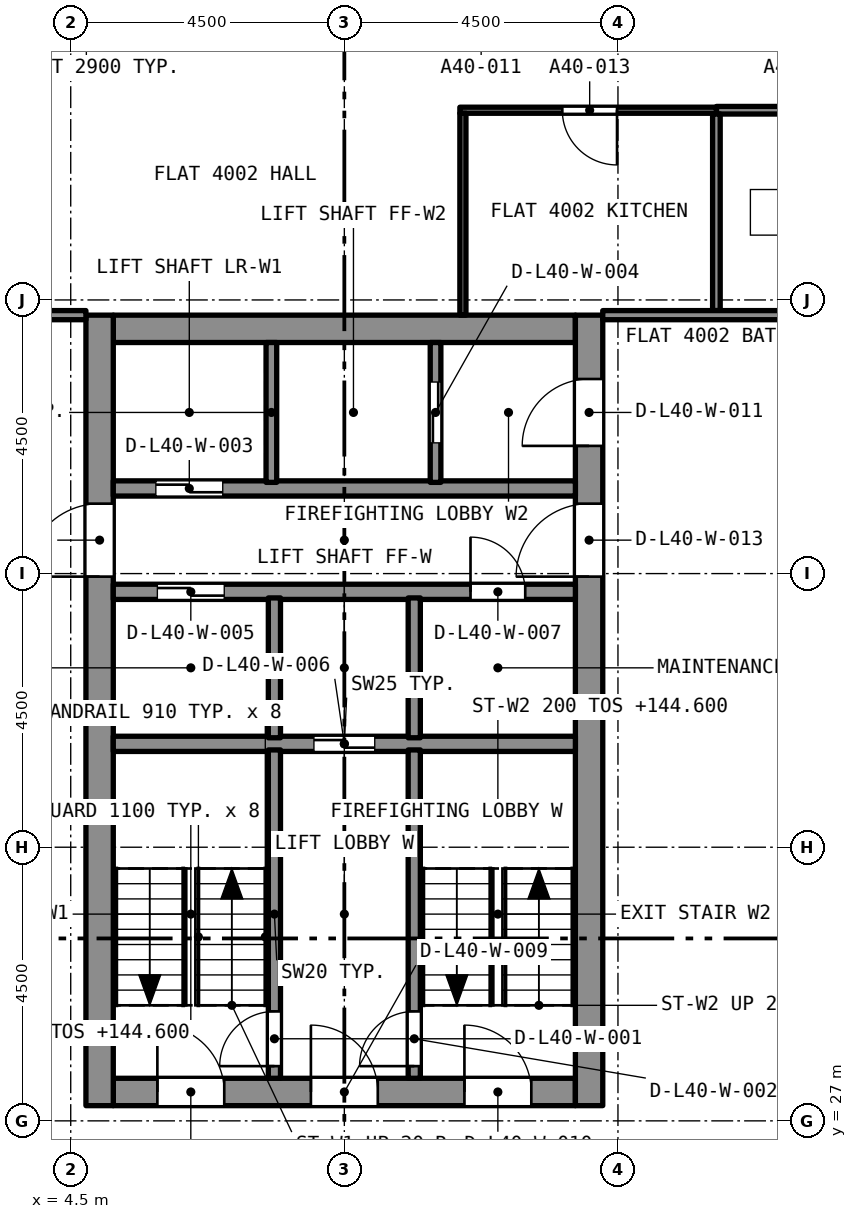
"""IFC4 building model, lengths in metres.
Left out: names, types, materials, properties, quantities, classifications, styles, units other than length and angle.
Written with IfcOpenShell. Run it as: python <this file> out.ifc"""

import sys

from ifc_helpers import new_model, si_unit, direction, frame, frame_2d, origin, place, context, subcontext, project, spatial, rectangle, extrude, element, fill, save


model = new_model("IFC4")
c1 = context("Model", 3, precision=1e-05, world=origin(), true_north=direction((0.0, 1.0)))
c2 = subcontext(c1, "Body", "Model", "MODEL_VIEW")
j1 = project(units=[si_unit("LENGTHUNIT", "METRE"), si_unit("PLANEANGLEUNIT", "RADIAN")], contexts=[c1])
p1 = place(None, origin())
s1 = spatial("IfcSite", under=j1, at=p1, CompositionType="ELEMENT")
p2 = place(p1, origin())
s2 = spatial("IfcBuilding", under=s1, at=p2, CompositionType="ELEMENT")
p3 = place(p2, frame((0.0, 0.0, 143.0)))
s3 = spatial("IfcBuildingStorey", under=s2, at=p3, CompositionType="ELEMENT", Elevation=143.0)
p4 = place(p3, frame((5.2, 27.475, 0.0), z_axis=(0.0, 0.0, 1.0), x_axis=(1.0, 0.0, 0.0)))
e1 = element("IfcWall", 1, at=p4, inside=s3, PredefinedType="SOLIDWALL", context=c2, shape_type="SweptSolid", body=[
    extrude(rectangle(XDim=7.6, YDim=0.45, at=frame_2d((3.8, 0.0))), origin(), (0.0, 0.0, 1.0), 3.2),
])
p5 = place(p4, frame((0.725, 0.0, 0.0)))
e2 = element("IfcOpeningElement", 2, at=p5, cuts=e1, PredefinedType="OPENING", context=c2, shape_type="SweptSolid", body=[
    extrude(rectangle(XDim=1.1, YDim=2.1, at=frame_2d((0.55, 1.05))), frame((0.0, 0.235, 0.0), z_axis=(0.0, -1.0, 0.0), x_axis=(1.0, 0.0, 0.0)), (0.0, 0.0, 1.0), 0.47),
])
p6 = place(p4, frame((3.25, 0.0, 0.0)))
e3 = element("IfcOpeningElement", 3, at=p6, cuts=e1, PredefinedType="OPENING", context=c2, shape_type="SweptSolid", body=[
    extrude(rectangle(XDim=1.1, YDim=2.1, at=frame_2d((0.55, 1.05))), frame((0.0, 0.235, 0.0), z_axis=(0.0, -1.0, 0.0), x_axis=(1.0, 0.0, 0.0)), (0.0, 0.0, 1.0), 0.47),
])
p7 = place(p4, frame((5.775, 0.0, 0.0)))
e4 = element("IfcOpeningElement", 4, at=p7, cuts=e1, PredefinedType="OPENING", context=c2, shape_type="SweptSolid", body=[
    extrude(rectangle(XDim=1.1, YDim=2.1, at=frame_2d((0.55, 1.05))), frame((0.0, 0.235, 0.0), z_axis=(0.0, -1.0, 0.0), x_axis=(1.0, 0.0, 0.0)), (0.0, 0.0, 1.0), 0.47),
])
p8 = place(p3, frame((5.2, 40.025, 0.0), z_axis=(0.0, 0.0, 1.0), x_axis=(1.0, 0.0, 0.0)))
e5 = element("IfcWall", 5, at=p8, inside=s3, PredefinedType="SOLIDWALL", context=c2, shape_type="SweptSolid", body=[
    extrude(rectangle(XDim=7.6, YDim=0.45, at=frame_2d((3.8, 0.0))), origin(), (0.0, 0.0, 1.0), 3.2),
])
p9 = place(p3, frame((4.975, 27.25, 0.0), z_axis=(0.0, 0.0, 1.0), x_axis=(0.0, 1.0, 0.0)))
e6 = element("IfcWall", 6, at=p9, inside=s3, PredefinedType="SOLIDWALL", context=c2, shape_type="SweptSolid", body=[
    extrude(rectangle(XDim=13.0, YDim=0.45, at=frame_2d((6.5, 0.0))), origin(), (0.0, 0.0, 1.0), 3.2),
])
p10 = place(p9, frame((8.7, 0.0, 0.0)))
e7 = element("IfcOpeningElement", 7, at=p10, cuts=e6, PredefinedType="OPENING", context=c2, shape_type="SweptSolid", body=[
    extrude(rectangle(XDim=1.2, YDim=2.1, at=frame_2d((0.6, 1.05))), frame((0.0, 0.235, 0.0), z_axis=(0.0, -1.0, 0.0), x_axis=(1.0, 0.0, 0.0)), (0.0, 0.0, 1.0), 0.47),
])
p11 = place(p3, frame((13.025, 27.25, 0.0), z_axis=(0.0, 0.0, 1.0), x_axis=(0.0, 1.0, 0.0)))
e8 = element("IfcWall", 8, at=p11, inside=s3, PredefinedType="SOLIDWALL", context=c2, shape_type="SweptSolid", body=[
    extrude(rectangle(XDim=13.0, YDim=0.45, at=frame_2d((6.5, 0.0))), origin(), (0.0, 0.0, 1.0), 3.2),
])
p12 = place(p11, frame((10.85, 0.0, 0.0)))
e9 = element("IfcOpeningElement", 9, at=p12, cuts=e8, PredefinedType="OPENING", context=c2, shape_type="SweptSolid", body=[
    extrude(rectangle(XDim=1.1, YDim=2.1, at=frame_2d((0.55, 1.05))), frame((0.0, 0.235, 0.0), z_axis=(0.0, -1.0, 0.0), x_axis=(1.0, 0.0, 0.0)), (0.0, 0.0, 1.0), 0.47),
])
p13 = place(p11, frame((8.7, 0.0, 0.0)))
e10 = element("IfcOpeningElement", 10, at=p13, cuts=e8, PredefinedType="OPENING", context=c2, shape_type="SweptSolid", body=[
    extrude(rectangle(XDim=1.2, YDim=2.1, at=frame_2d((0.6, 1.05))), frame((0.0, 0.235, 0.0), z_axis=(0.0, -1.0, 0.0), x_axis=(1.0, 0.0, 0.0)), (0.0, 0.0, 1.0), 0.47),
])
p14 = place(p3, frame((17.875, 43.62, 0.0), z_axis=(0.0, 0.0, 1.0), x_axis=(-1.0, 0.0, 0.0)))
e11 = element("IfcWall", 11, at=p14, inside=s3, PredefinedType="PARTITIONING", context=c2, shape_type="SweptSolid", body=[
    extrude(rectangle(XDim=2.756, YDim=0.125, at=frame_2d((1.378, 0.0))), origin(), (0.0, 0.0, 1.0), 2.9),
])
p15 = place(p14, frame((0.915, 0.0, 0.0)))
e12 = element("IfcOpeningElement", 12, at=p15, cuts=e11, PredefinedType="OPENING", context=c2, shape_type="SweptSolid", body=[
    extrude(rectangle(XDim=0.8, YDim=2.1, at=frame_2d((0.4, 1.05))), frame((0.0, 0.073, 0.0), z_axis=(0.0, -1.0, 0.0), x_axis=(1.0, 0.0, 0.0)), (0.0, 0.0, 1.0), 0.145),
])
p16 = place(p3, frame((15.119, 40.325, 0.0), z_axis=(0.0, 0.0, 1.0), x_axis=(0.0, 1.0, 0.0)))
e13 = element("IfcWall", 13, at=p16, inside=s3, PredefinedType="PARTITIONING", context=c2, shape_type="SweptSolid", body=[
    extrude(rectangle(XDim=3.233, YDim=0.125, at=frame_2d((1.616, 0.0))), origin(), (0.0, 0.0, 1.0), 2.9),
])
p17 = place(p3, frame((15.119, 43.62, 0.0), z_axis=(0.0, 0.0, 1.0), x_axis=(-1.0, 0.0, 0.0)))
e14 = element("IfcWall", 14, at=p17, inside=s3, PredefinedType="PARTITIONING", context=c2, shape_type="SweptSolid", body=[
    extrude(rectangle(XDim=4.219, YDim=0.1, at=frame_2d((2.11, 0.0))), origin(), (0.0, 0.0, 1.0), 2.9),
])
p18 = place(p17, frame((1.635, 0.0, 0.0)))
e15 = element("IfcOpeningElement", 15, at=p18, cuts=e14, PredefinedType="OPENING", context=c2, shape_type="SweptSolid", body=[
    extrude(rectangle(XDim=0.9, YDim=2.1, at=frame_2d((0.45, 1.05))), frame((0.0, 0.06, 0.0), z_axis=(0.0, -1.0, 0.0), x_axis=(1.0, 0.0, 0.0)), (0.0, 0.0, 1.0), 0.12),
])
p19 = place(p3, frame((10.95, 40.25, 0.0), z_axis=(0.0, 0.0, 1.0), x_axis=(0.0, 1.0, 0.0)))
e16 = element("IfcWall", 16, at=p19, inside=s3, PredefinedType="PARTITIONING", context=c2, shape_type="SweptSolid", body=[
    extrude(rectangle(XDim=3.32, YDim=0.1, at=frame_2d((1.66, 0.0))), origin(), (0.0, 0.0, 1.0), 2.9),
])
p20 = place(p3, frame((0.475, 40.25, 0.0), z_axis=(0.0, 0.0, 1.0), x_axis=(1.0, 0.0, 0.0)))
e17 = element("IfcWall", 17, at=p20, inside=s3, PredefinedType="PARTITIONING", context=c2, shape_type="SweptSolid", body=[
    extrude(rectangle(XDim=4.275, YDim=0.15, at=frame_2d((2.137, 0.0))), origin(), (0.0, 0.0, 1.0), 2.9),
])
p21 = place(p20, frame((1.275, 0.0, 0.0)))
e18 = element("IfcOpeningElement", 18, at=p21, cuts=e17, PredefinedType="OPENING", context=c2, shape_type="SweptSolid", body=[
    extrude(rectangle(XDim=1.0, YDim=2.1, at=frame_2d((0.5, 1.05))), frame((0.0, 0.085, 0.0), z_axis=(0.0, -1.0, 0.0), x_axis=(1.0, 0.0, 0.0)), (0.0, 0.0, 1.0), 0.17),
])
p22 = place(p3, frame((13.25, 40.25, 0.0), z_axis=(0.0, 0.0, 1.0), x_axis=(1.0, 0.0, 0.0)))
e19 = element("IfcWall", 19, at=p22, inside=s3, PredefinedType="PARTITIONING", context=c2, shape_type="SweptSolid", body=[
    extrude(rectangle(XDim=4.275, YDim=0.15, at=frame_2d((2.137, 0.0))), origin(), (0.0, 0.0, 1.0), 2.9),
])
p23 = place(p3, frame((5.2, 33.2, 0.0), z_axis=(0.0, 0.0, 1.0), x_axis=(1.0, 0.0, 0.0)))
e20 = element("IfcWall", 20, at=p23, inside=s3, PredefinedType="SOLIDWALL", context=c2, shape_type="SweptSolid", body=[
    extrude(rectangle(XDim=7.6, YDim=0.25, at=frame_2d((3.8, 0.0))), origin(), (0.0, 0.0, 1.0), 2.9),
])
p24 = place(p23, frame((3.3, 0.0, 0.0)))
e21 = element("IfcOpeningElement", 21, at=p24, cuts=e20, PredefinedType="OPENING", context=c2, shape_type="SweptSolid", body=[
    extrude(rectangle(XDim=1.0, YDim=2.1, at=frame_2d((0.5, 1.05))), frame((0.0, 0.135, 0.0), z_axis=(0.0, -1.0, 0.0), x_axis=(1.0, 0.0, 0.0)), (0.0, 0.0, 1.0), 0.27),
])
p25 = place(p3, frame((5.2, 35.7, 0.0), z_axis=(0.0, 0.0, 1.0), x_axis=(1.0, 0.0, 0.0)))
e22 = element("IfcWall", 22, at=p25, inside=s3, PredefinedType="SOLIDWALL", context=c2, shape_type="SweptSolid", body=[
    extrude(rectangle(XDim=7.6, YDim=0.25, at=frame_2d((3.8, 0.0))), origin(), (0.0, 0.0, 1.0), 2.9),
])
p26 = place(p25, frame((0.725, 0.0, 0.0)))
e23 = element("IfcOpeningElement", 23, at=p26, cuts=e22, PredefinedType="OPENING", context=c2, shape_type="SweptSolid", body=[
    extrude(rectangle(XDim=1.1, YDim=2.4, at=frame_2d((0.55, 1.2))), frame((0.0, 0.135, 0.0), z_axis=(0.0, -1.0, 0.0), x_axis=(1.0, 0.0, 0.0)), (0.0, 0.0, 1.0), 0.27),
])
p27 = place(p25, frame((5.875, 0.0, 0.0)))
e24 = element("IfcOpeningElement", 24, at=p27, cuts=e22, PredefinedType="OPENING", context=c2, shape_type="SweptSolid", body=[
    extrude(rectangle(XDim=0.9, YDim=2.1, at=frame_2d((0.45, 1.05))), frame((0.0, 0.135, 0.0), z_axis=(0.0, -1.0, 0.0), x_axis=(1.0, 0.0, 0.0)), (0.0, 0.0, 1.0), 0.27),
])
p28 = place(p3, frame((5.2, 37.4, 0.0), z_axis=(0.0, 0.0, 1.0), x_axis=(1.0, 0.0, 0.0)))
e25 = element("IfcWall", 25, at=p28, inside=s3, PredefinedType="SOLIDWALL", context=c2, shape_type="SweptSolid", body=[
    extrude(rectangle(XDim=7.6, YDim=0.25, at=frame_2d((3.8, 0.0))), origin(), (0.0, 0.0, 1.0), 2.9),
])
p29 = place(p28, frame((0.7, 0.0, 0.0)))
e26 = element("IfcOpeningElement", 26, at=p29, cuts=e25, PredefinedType="OPENING", context=c2, shape_type="SweptSolid", body=[
    extrude(rectangle(XDim=1.1, YDim=2.4, at=frame_2d((0.55, 1.2))), frame((0.0, 0.135, 0.0), z_axis=(0.0, -1.0, 0.0), x_axis=(1.0, 0.0, 0.0)), (0.0, 0.0, 1.0), 0.27),
])
p30 = place(p3, frame((7.85, 27.7, 0.0), z_axis=(0.0, 0.0, 1.0), x_axis=(0.0, 1.0, 0.0)))
e27 = element("IfcWall", 27, at=p30, inside=s3, PredefinedType="SOLIDWALL", context=c2, shape_type="SweptSolid", body=[
    extrude(rectangle(XDim=5.4, YDim=0.2, at=frame_2d((2.7, 0.0))), origin(), (0.0, 0.0, 1.0), 2.9),
])
p31 = place(p30, frame((0.2, 0.0, 0.0)))
e28 = element("IfcOpeningElement", 28, at=p31, cuts=e27, PredefinedType="OPENING", context=c2, shape_type="SweptSolid", body=[
    extrude(rectangle(XDim=0.9, YDim=2.1, at=frame_2d((0.45, 1.05))), frame((0.0, 0.11, 0.0), z_axis=(0.0, -1.0, 0.0), x_axis=(1.0, 0.0, 0.0)), (0.0, 0.0, 1.0), 0.22),
])
p32 = place(p3, frame((10.15, 27.7, 0.0), z_axis=(0.0, 0.0, 1.0), x_axis=(0.0, 1.0, 0.0)))
e29 = element("IfcWall", 29, at=p32, inside=s3, PredefinedType="SOLIDWALL", context=c2, shape_type="SweptSolid", body=[
    extrude(rectangle(XDim=5.4, YDim=0.2, at=frame_2d((2.7, 0.0))), origin(), (0.0, 0.0, 1.0), 2.9),
])
p33 = place(p32, frame((0.2, 0.0, 0.0)))
e30 = element("IfcOpeningElement", 30, at=p33, cuts=e29, PredefinedType="OPENING", context=c2, shape_type="SweptSolid", body=[
    extrude(rectangle(XDim=0.9, YDim=2.1, at=frame_2d((0.45, 1.05))), frame((0.0, 0.11, 0.0), z_axis=(0.0, -1.0, 0.0), x_axis=(1.0, 0.0, 0.0)), (0.0, 0.0, 1.0), 0.22),
])
for number, where, z_axis, x_axis in (
    (31, (7.85, 33.3, 0.0), (0.0, 0.0, 1.0), (0.0, 1.0, 0.0)),
    (32, (10.15, 33.3, 0.0), (0.0, 0.0, 1.0), (0.0, 1.0, 0.0)),
):
    element("IfcWall", number, at=place(p3, frame(where, z_axis=z_axis, x_axis=x_axis)), inside=s3, PredefinedType="SOLIDWALL", context=c2, shape_type="SweptSolid", body=[
        extrude(rectangle(XDim=2.3, YDim=0.2, at=frame_2d((1.15, 0.0))), origin(), (0.0, 0.0, 1.0), 2.9),
    ])
p34 = place(p3, frame((7.8, 37.5, 0.0), z_axis=(0.0, 0.0, 1.0), x_axis=(0.0, 1.0, 0.0)))
e33 = element("IfcWall", 33, at=p34, inside=s3, PredefinedType="SOLIDWALL", context=c2, shape_type="SweptSolid", body=[
    extrude(rectangle(XDim=2.3, YDim=0.175, at=frame_2d((1.15, 0.0))), origin(), (0.0, 0.0, 1.0), 2.9),
])
p35 = place(p3, frame((10.5, 37.5, 0.0), z_axis=(0.0, 0.0, 1.0), x_axis=(0.0, 1.0, 0.0)))
e34 = element("IfcWall", 34, at=p35, inside=s3, PredefinedType="SOLIDWALL", context=c2, shape_type="SweptSolid", body=[
    extrude(rectangle(XDim=2.3, YDim=0.175, at=frame_2d((1.15, 0.0))), origin(), (0.0, 0.0, 1.0), 2.9),
])
p36 = place(p35, frame((0.65, 0.0, 0.0)))
e35 = element("IfcOpeningElement", 35, at=p36, cuts=e34, PredefinedType="OPENING", context=c2, shape_type="SweptSolid", body=[
    extrude(rectangle(XDim=1.0, YDim=2.1, at=frame_2d((0.5, 1.05))), frame((0.0, 0.097, 0.0), z_axis=(0.0, -1.0, 0.0), x_axis=(1.0, 0.0, 0.0)), (0.0, 0.0, 1.0), 0.195),
])
p37 = place(p18, origin())
e36 = element("IfcDoor", 36, at=p37, inside=s3, OperationType="SINGLE_SWING_LEFT", PredefinedType="DOOR", context=c2, shape_type="SweptSolid", body=[
    extrude(rectangle(XDim=0.9, YDim=2.1, at=frame_2d((0.45, 1.05))), frame((0.0, 0.025, 0.0), z_axis=(0.0, -1.0, 0.0), x_axis=(1.0, 0.0, 0.0)), (0.0, 0.0, 1.0), 0.05),
])
fill(e15, e36)
p38 = place(p31, origin())
e37 = element("IfcDoor", 37, at=p38, inside=s3, OperationType="SINGLE_SWING_LEFT", PredefinedType="DOOR", context=c2, shape_type="SweptSolid", body=[
    extrude(rectangle(XDim=0.9, YDim=2.1, at=frame_2d((0.45, 1.05))), frame((0.0, 0.025, 0.0), z_axis=(0.0, -1.0, 0.0), x_axis=(1.0, 0.0, 0.0)), (0.0, 0.0, 1.0), 0.05),
])
fill(e28, e37)
p39 = place(p33, origin())
e38 = element("IfcDoor", 38, at=p39, inside=s3, OperationType="SINGLE_SWING_LEFT", PredefinedType="DOOR", context=c2, shape_type="SweptSolid", body=[
    extrude(rectangle(XDim=0.9, YDim=2.1, at=frame_2d((0.45, 1.05))), frame((0.0, 0.025, 0.0), z_axis=(0.0, -1.0, 0.0), x_axis=(1.0, 0.0, 0.0)), (0.0, 0.0, 1.0), 0.05),
])
fill(e30, e38)
p40 = place(p29, origin())
e39 = element("IfcDoor", 39, at=p40, inside=s3, OperationType="SLIDING_TO_LEFT", PredefinedType="DOOR", context=c2, shape_type="SweptSolid", body=[
    extrude(rectangle(XDim=1.1, YDim=2.4, at=frame_2d((0.55, 1.2))), frame((0.0, 0.025, 0.0), z_axis=(0.0, -1.0, 0.0), x_axis=(1.0, 0.0, 0.0)), (0.0, 0.0, 1.0), 0.05),
])
fill(e26, e39)
p41 = place(p36, origin())
e40 = element("IfcDoor", 40, at=p41, inside=s3, OperationType="SLIDING_TO_LEFT", PredefinedType="DOOR", context=c2, shape_type="SweptSolid", body=[
    extrude(rectangle(XDim=1.0, YDim=2.1, at=frame_2d((0.5, 1.05))), frame((0.0, 0.025, 0.0), z_axis=(0.0, -1.0, 0.0), x_axis=(1.0, 0.0, 0.0)), (0.0, 0.0, 1.0), 0.05),
])
fill(e35, e40)
p42 = place(p26, origin())
e41 = element("IfcDoor", 41, at=p42, inside=s3, OperationType="SLIDING_TO_LEFT", PredefinedType="DOOR", context=c2, shape_type="SweptSolid", body=[
    extrude(rectangle(XDim=1.1, YDim=2.4, at=frame_2d((0.55, 1.2))), frame((0.0, 0.025, 0.0), z_axis=(0.0, -1.0, 0.0), x_axis=(1.0, 0.0, 0.0)), (0.0, 0.0, 1.0), 0.05),
])
fill(e23, e41)
p43 = place(p24, origin())
e42 = element("IfcDoor", 42, at=p43, inside=s3, OperationType="SLIDING_TO_LEFT", PredefinedType="DOOR", context=c2, shape_type="SweptSolid", body=[
    extrude(rectangle(XDim=1.0, YDim=2.1, at=frame_2d((0.5, 1.05))), frame((0.0, 0.025, 0.0), z_axis=(0.0, -1.0, 0.0), x_axis=(1.0, 0.0, 0.0)), (0.0, 0.0, 1.0), 0.05),
])
fill(e21, e42)
p44 = place(p27, origin())
e43 = element("IfcDoor", 43, at=p44, inside=s3, OperationType="SINGLE_SWING_LEFT", PredefinedType="DOOR", context=c2, shape_type="SweptSolid", body=[
    extrude(rectangle(XDim=0.9, YDim=2.1, at=frame_2d((0.45, 1.05))), frame((0.0, 0.025, 0.0), z_axis=(0.0, -1.0, 0.0), x_axis=(1.0, 0.0, 0.0)), (0.0, 0.0, 1.0), 0.05),
])
fill(e24, e43)
p45 = place(p5, origin())
e44 = element("IfcDoor", 44, at=p45, inside=s3, OperationType="SINGLE_SWING_LEFT", PredefinedType="DOOR", context=c2, shape_type="SweptSolid", body=[
    extrude(rectangle(XDim=1.1, YDim=2.1, at=frame_2d((0.55, 1.05))), frame((0.0, 0.025, 0.0), z_axis=(0.0, -1.0, 0.0), x_axis=(1.0, 0.0, 0.0)), (0.0, 0.0, 1.0), 0.05),
])
fill(e2, e44)
p46 = place(p6, origin())
e45 = element("IfcDoor", 45, at=p46, inside=s3, OperationType="SINGLE_SWING_LEFT", PredefinedType="DOOR", context=c2, shape_type="SweptSolid", body=[
    extrude(rectangle(XDim=1.1, YDim=2.1, at=frame_2d((0.55, 1.05))), frame((0.0, 0.025, 0.0), z_axis=(0.0, -1.0, 0.0), x_axis=(1.0, 0.0, 0.0)), (0.0, 0.0, 1.0), 0.05),
])
fill(e3, e45)
p47 = place(p7, origin())
e46 = element("IfcDoor", 46, at=p47, inside=s3, OperationType="SINGLE_SWING_LEFT", PredefinedType="DOOR", context=c2, shape_type="SweptSolid", body=[
    extrude(rectangle(XDim=1.1, YDim=2.1, at=frame_2d((0.55, 1.05))), frame((0.0, 0.025, 0.0), z_axis=(0.0, -1.0, 0.0), x_axis=(1.0, 0.0, 0.0)), (0.0, 0.0, 1.0), 0.05),
])
fill(e4, e46)
p48 = place(p12, origin())
e47 = element("IfcDoor", 47, at=p48, inside=s3, OperationType="SINGLE_SWING_LEFT", PredefinedType="DOOR", context=c2, shape_type="SweptSolid", body=[
    extrude(rectangle(XDim=1.1, YDim=2.1, at=frame_2d((0.55, 1.05))), frame((0.0, 0.025, 0.0), z_axis=(0.0, -1.0, 0.0), x_axis=(1.0, 0.0, 0.0)), (0.0, 0.0, 1.0), 0.05),
])
fill(e9, e47)
p49 = place(p10, origin())
e48 = element("IfcDoor", 48, at=p49, inside=s3, OperationType="SINGLE_SWING_LEFT", PredefinedType="DOOR", context=c2, shape_type="SweptSolid", body=[
    extrude(rectangle(XDim=1.2, YDim=2.1, at=frame_2d((0.6, 1.05))), frame((0.0, 0.025, 0.0), z_axis=(0.0, -1.0, 0.0), x_axis=(1.0, 0.0, 0.0)), (0.0, 0.0, 1.0), 0.05),
])
fill(e7, e48)
p50 = place(p13, origin())
e49 = element("IfcDoor", 49, at=p50, inside=s3, OperationType="SINGLE_SWING_LEFT", PredefinedType="DOOR", context=c2, shape_type="SweptSolid", body=[
    extrude(rectangle(XDim=1.2, YDim=2.1, at=frame_2d((0.6, 1.05))), frame((0.0, 0.025, 0.0), z_axis=(0.0, -1.0, 0.0), x_axis=(1.0, 0.0, 0.0)), (0.0, 0.0, 1.0), 0.05),
])
fill(e10, e49)
save(model, sys.argv[1])
